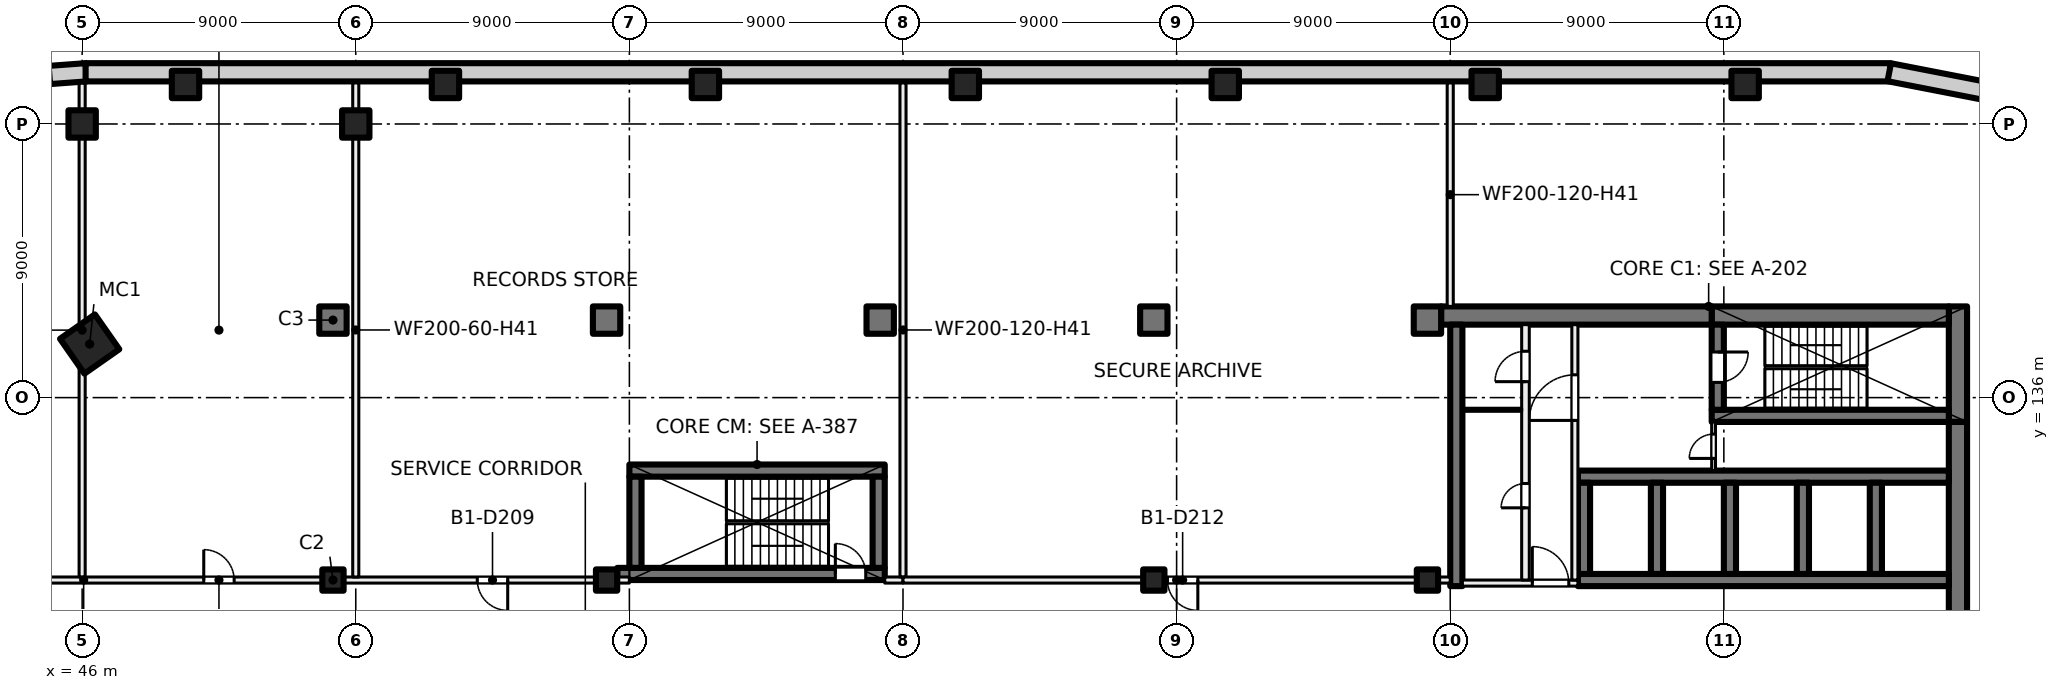
"""IFC4 building model, lengths in metres.
Left out: names, types, materials, properties, quantities, classifications, styles, units other than length and angle.
Written with IfcOpenShell. Run it as: python <this file> out.ifc"""

import sys

from ifc_helpers import new_model, si_unit, direction, frame, frame_2d, origin, origin_2d, place, context, subcontext, project, spatial, rectangle, hollow_rectangle, extrude, element, fill, save


model = new_model("IFC4")
c1 = context("Model", 3, precision=1e-05, world=origin(), true_north=direction((0.0, 1.0)))
c2 = subcontext(c1, "Body", "Model", "MODEL_VIEW")
j1 = project(units=[si_unit("LENGTHUNIT", "METRE"), si_unit("PLANEANGLEUNIT", "RADIAN")], contexts=[c1])
p1 = place(None, origin())
s1 = spatial("IfcSite", under=j1, at=p1, CompositionType="ELEMENT")
p2 = place(p1, origin())
s2 = spatial("IfcBuilding", under=s1, at=p2, CompositionType="ELEMENT")
p3 = place(p2, frame((0.0, 0.0, -4.5)))
s3 = spatial("IfcBuildingStorey", under=s2, at=p3, CompositionType="ELEMENT", Elevation=-4.5)
p4 = place(p3, frame((44.923, 146.611, 0.0), z_axis=(0.0, 0.0, 1.0), x_axis=(0.99726994401, 0.073842120603, 0.0)))
e1 = element("IfcWall", 1, at=p4, inside=s3, PredefinedType="SHEAR", context=c2, shape_type="SweptSolid", body=[
    extrude(rectangle(XDim=1.217, YDim=0.6, at=frame_2d((0.608, 0.0))), origin(), (0.0, 0.0, 1.0), 4.5),
])
p5 = place(p3, frame((46.114, 146.7, 0.0), z_axis=(0.0, 0.0, 1.0), x_axis=(1.0, 0.0, 0.0)))
e2 = element("IfcWall", 2, at=p5, inside=s3, PredefinedType="SHEAR", context=c2, shape_type="SweptSolid", body=[
    extrude(rectangle(XDim=59.364, YDim=0.6, at=frame_2d((29.682, 0.0))), origin(), (0.0, 0.0, 1.0), 4.5),
])
p6 = place(p3, frame((105.44, 146.702, 0.0), z_axis=(0.0, 0.0, 1.0), x_axis=(0.981593603981, -0.190981665674, 0.0)))
e3 = element("IfcWall", 3, at=p6, inside=s3, PredefinedType="SHEAR", context=c2, shape_type="SweptSolid", body=[
    extrude(rectangle(XDim=4.025, YDim=0.6, at=frame_2d((2.013, 0.0))), origin(), (0.0, 0.0, 1.0), 4.5),
])
for number, where, z_axis, x_axis in (
    (4, (46.0, 145.0, 0.0), (0.0, 0.0, 1.0), (1.0, 0.0, 0.0)),
    (5, (55.0, 145.0, 0.0), (0.0, 0.0, 1.0), (1.0, 0.0, 0.0)),
    (6, (49.4, 146.3, 0.0), (0.0, 0.0, 1.0), (1.0, 0.0, 0.0)),
    (7, (57.95, 146.3, 0.0), (0.0, 0.0, 1.0), (1.0, 0.0, 0.0)),
    (8, (66.5, 146.3, 0.0), (0.0, 0.0, 1.0), (1.0, 0.0, 0.0)),
    (9, (75.05, 146.3, 0.0), (0.0, 0.0, 1.0), (1.0, 0.0, 0.0)),
    (10, (83.6, 146.3, 0.0), (0.0, 0.0, 1.0), (1.0, 0.0, 0.0)),
    (11, (92.15, 146.3, 0.0), (0.0, 0.0, 1.0), (1.0, 0.0, 0.0)),
    (12, (100.7, 146.3, 0.0), (0.0, 0.0, 1.0), (1.0, 0.0, 0.0)),
):
    element("IfcColumn", number, at=place(p3, frame(where, z_axis=z_axis, x_axis=x_axis)), inside=s3, PredefinedType="COLUMN", context=c2, shape_type="SweptSolid", body=[
        extrude(rectangle(XDim=0.9, YDim=0.9, at=origin_2d()), origin(), (0.0, 0.0, 1.0), 4.5),
    ])
p7 = place(p3, frame((46.247, 137.762, 0.0), z_axis=(0.0, 0.0, 1.0), x_axis=(0.573576436351, -0.819152044289, 0.0)))
e13 = element("IfcColumn", 13, at=p7, inside=s3, PredefinedType="COLUMN", context=c2, shape_type="SweptSolid", body=[
    extrude(hollow_rectangle(XDim=1.4, YDim=1.4, WallThickness=0.04, at=origin_2d()), origin(), (0.0, 0.0, 1.0), 4.5),
])
for number, where, z_axis, x_axis in (
    (14, (54.25, 130.0, 0.0), (0.0, 0.0, 1.0), (1.0, 0.0, 0.0)),
    (15, (63.25, 130.0, 0.0), (0.0, 0.0, 1.0), (1.0, 0.0, 0.0)),
    (16, (81.25, 130.0, 0.0), (0.0, 0.0, 1.0), (1.0, 0.0, 0.0)),
    (17, (90.25, 130.0, 0.0), (0.0, 0.0, 1.0), (1.0, 0.0, 0.0)),
):
    element("IfcColumn", number, at=place(p3, frame(where, z_axis=z_axis, x_axis=x_axis)), inside=s3, PredefinedType="COLUMN", context=c2, shape_type="SweptSolid", body=[
        extrude(rectangle(XDim=0.7, YDim=0.7, at=origin_2d()), origin(), (0.0, 0.0, 1.0), 4.5),
    ])
for number, where, z_axis, x_axis in (
    (18, (54.25, 138.55, 0.0), (0.0, 0.0, 1.0), (1.0, 0.0, 0.0)),
    (19, (63.25, 138.55, 0.0), (0.0, 0.0, 1.0), (1.0, 0.0, 0.0)),
    (20, (72.25, 138.55, 0.0), (0.0, 0.0, 1.0), (1.0, 0.0, 0.0)),
    (21, (81.25, 138.55, 0.0), (0.0, 0.0, 1.0), (1.0, 0.0, 0.0)),
    (22, (90.25, 138.55, 0.0), (0.0, 0.0, 1.0), (1.0, 0.0, 0.0)),
):
    element("IfcColumn", number, at=place(p3, frame(where, z_axis=z_axis, x_axis=x_axis)), inside=s3, PredefinedType="COLUMN", context=c2, shape_type="SweptSolid", body=[
        extrude(rectangle(XDim=0.9, YDim=0.9, at=origin_2d()), origin(), (0.0, 0.0, 1.0), 4.5),
    ])
p8 = place(p3, frame((107.7, 139.0, 0.0), z_axis=(0.0, 0.0, 1.0), x_axis=(0.0, -1.0, 0.0)))
e23 = element("IfcWall", 23, at=p8, inside=s3, PredefinedType="SHEAR", context=c2, shape_type="SweptSolid", body=[
    extrude(rectangle(XDim=3.8, YDim=0.6, at=frame_2d((1.9, 0.0))), origin(), (0.0, 0.0, 1.0), 4.5),
])
p9 = place(p3, frame((107.7, 135.2, 0.0), z_axis=(0.0, 0.0, 1.0), x_axis=(0.0, -1.0, 0.0)))
e24 = element("IfcWall", 24, at=p9, inside=s3, PredefinedType="SHEAR", context=c2, shape_type="SweptSolid", body=[
    extrude(rectangle(XDim=14.4, YDim=0.6, at=frame_2d((7.2, 0.0))), origin(), (0.0, 0.0, 1.0), 4.5),
])
p10 = place(p3, frame((107.4, 138.7, 0.0), z_axis=(0.0, 0.0, 1.0), x_axis=(-1.0, 0.0, 0.0)))
e25 = element("IfcWall", 25, at=p10, inside=s3, PredefinedType="SHEAR", context=c2, shape_type="SweptSolid", body=[
    extrude(rectangle(XDim=7.8, YDim=0.6, at=frame_2d((3.9, 0.0))), origin(), (0.0, 0.0, 1.0), 4.5),
])
p11 = place(p3, frame((99.6, 138.7, 0.0), z_axis=(0.0, 0.0, 1.0), x_axis=(-1.0, 0.0, 0.0)))
e26 = element("IfcWall", 26, at=p11, inside=s3, PredefinedType="SHEAR", context=c2, shape_type="SweptSolid", body=[
    extrude(rectangle(XDim=8.9, YDim=0.6, at=frame_2d((4.45, 0.0))), origin(), (0.0, 0.0, 1.0), 4.5),
])
p12 = place(p3, frame((107.4, 135.4, 0.0), z_axis=(0.0, 0.0, 1.0), x_axis=(-1.0, 0.0, 0.0)))
e27 = element("IfcWall", 27, at=p12, inside=s3, PredefinedType="SHEAR", context=c2, shape_type="SweptSolid", body=[
    extrude(rectangle(XDim=7.8, YDim=0.4, at=frame_2d((3.9, 0.0))), origin(), (0.0, 0.0, 1.0), 4.5),
])
p13 = place(p3, frame((99.8, 138.4, 0.0), z_axis=(0.0, 0.0, 1.0), x_axis=(0.0, -1.0, 0.0)))
e28 = element("IfcWall", 28, at=p13, inside=s3, PredefinedType="SHEAR", context=c2, shape_type="SweptSolid", body=[
    extrude(rectangle(XDim=2.8, YDim=0.4, at=frame_2d((1.4, 0.0))), origin(), (0.0, 0.0, 1.0), 4.5),
])
p14 = place(p13, frame((0.9, 0.0, 0.0)))
e29 = element("IfcOpeningElement", 29, at=p14, cuts=e28, PredefinedType="OPENING", context=c2, shape_type="SweptSolid", body=[
    extrude(rectangle(XDim=1.0, YDim=2.1, at=frame_2d((0.5, 1.05))), frame((0.0, 0.21, 0.0), z_axis=(0.0, -1.0, 0.0), x_axis=(1.0, 0.0, 0.0)), (0.0, 0.0, 1.0), 0.42),
])
for number, where, z_axis, x_axis in (
    (30, (107.4, 130.0, 0.0), (0.0, 0.0, 1.0), (-1.0, 0.0, 0.0)),
    (31, (107.4, 133.4, 0.0), (0.0, 0.0, 1.0), (-1.0, 0.0, 0.0)),
):
    element("IfcWall", number, at=place(p3, frame(where, z_axis=z_axis, x_axis=x_axis)), inside=s3, PredefinedType="SHEAR", context=c2, shape_type="SweptSolid", body=[
        extrude(rectangle(XDim=12.2, YDim=0.4, at=frame_2d((6.1, 0.0))), origin(), (0.0, 0.0, 1.0), 4.5),
    ])
for number, where, z_axis, x_axis in (
    (32, (105.0, 133.2, 0.0), (0.0, 0.0, 1.0), (0.0, -1.0, 0.0)),
    (33, (102.6, 133.2, 0.0), (0.0, 0.0, 1.0), (0.0, -1.0, 0.0)),
    (34, (100.2, 133.2, 0.0), (0.0, 0.0, 1.0), (0.0, -1.0, 0.0)),
    (35, (97.8, 133.2, 0.0), (0.0, 0.0, 1.0), (0.0, -1.0, 0.0)),
    (36, (95.4, 133.2, 0.0), (0.0, 0.0, 1.0), (0.0, -1.0, 0.0)),
):
    element("IfcWall", number, at=place(p3, frame(where, z_axis=z_axis, x_axis=x_axis)), inside=s3, PredefinedType="SHEAR", context=c2, shape_type="SweptSolid", body=[
        extrude(rectangle(XDim=3.0, YDim=0.4, at=frame_2d((1.5, 0.0))), origin(), (0.0, 0.0, 1.0), 4.5),
    ])
p15 = place(p3, frame((91.2, 138.4, 0.0), z_axis=(0.0, 0.0, 1.0), x_axis=(0.0, -1.0, 0.0)))
e37 = element("IfcWall", 37, at=p15, inside=s3, PredefinedType="SHEAR", context=c2, shape_type="SweptSolid", body=[
    extrude(rectangle(XDim=8.6, YDim=0.4, at=frame_2d((4.3, 0.0))), origin(), (0.0, 0.0, 1.0), 4.5),
])
p16 = place(p3, frame((63.6, 130.2, 0.0), z_axis=(0.0, 0.0, 1.0), x_axis=(1.0, 0.0, 0.0)))
e38 = element("IfcWall", 38, at=p16, inside=s3, PredefinedType="SHEAR", context=c2, shape_type="SweptSolid", body=[
    extrude(rectangle(XDim=8.8, YDim=0.4, at=frame_2d((4.4, 0.0))), origin(), (0.0, 0.0, 1.0), 4.5),
])
p17 = place(p16, frame((7.175, 0.0, 0.0)))
e39 = element("IfcOpeningElement", 39, at=p17, cuts=e38, PredefinedType="OPENING", context=c2, shape_type="SweptSolid", body=[
    extrude(rectangle(XDim=1.0, YDim=2.1, at=frame_2d((0.5, 1.05))), frame((0.0, 0.21, 0.0), z_axis=(0.0, -1.0, 0.0), x_axis=(1.0, 0.0, 0.0)), (0.0, 0.0, 1.0), 0.42),
])
p18 = place(p3, frame((64.0, 133.6, 0.0), z_axis=(0.0, 0.0, 1.0), x_axis=(1.0, 0.0, 0.0)))
e40 = element("IfcWall", 40, at=p18, inside=s3, PredefinedType="SHEAR", context=c2, shape_type="SweptSolid", body=[
    extrude(rectangle(XDim=8.4, YDim=0.4, at=frame_2d((4.2, 0.0))), origin(), (0.0, 0.0, 1.0), 4.5),
])
for number, where, z_axis, x_axis in (
    (41, (64.2, 130.4, 0.0), (0.0, 0.0, 1.0), (0.0, 1.0, 0.0)),
    (42, (72.2, 130.4, 0.0), (0.0, 0.0, 1.0), (0.0, 1.0, 0.0)),
):
    element("IfcWall", number, at=place(p3, frame(where, z_axis=z_axis, x_axis=x_axis)), inside=s3, PredefinedType="SHEAR", context=c2, shape_type="SweptSolid", body=[
        extrude(rectangle(XDim=3.0, YDim=0.4, at=frame_2d((1.5, 0.0))), origin(), (0.0, 0.0, 1.0), 4.5),
    ])
p19 = place(p3, frame((91.4, 129.9, 0.0), z_axis=(0.0, 0.0, 1.0), x_axis=(1.0, 0.0, 0.0)))
e43 = element("IfcWall", 43, at=p19, inside=s3, PredefinedType="PARTITIONING", context=c2, shape_type="SweptSolid", body=[
    extrude(rectangle(XDim=3.8, YDim=0.2, at=frame_2d((1.9, 0.0))), origin(), (0.0, 0.0, 1.0), 4.1),
])
p20 = place(p19, frame((2.3, 0.0, 0.0)))
e44 = element("IfcOpeningElement", 44, at=p20, cuts=e43, PredefinedType="OPENING", context=c2, shape_type="SweptSolid", body=[
    extrude(rectangle(XDim=1.2, YDim=2.1, at=frame_2d((0.6, 1.05))), frame((0.0, 0.11, 0.0), z_axis=(0.0, -1.0, 0.0), x_axis=(1.0, 0.0, 0.0)), (0.0, 0.0, 1.0), 0.22),
])
p21 = place(p3, frame((95.1, 130.0, 0.0), z_axis=(0.0, 0.0, 1.0), x_axis=(0.0, 1.0, 0.0)))
e45 = element("IfcWall", 45, at=p21, inside=s3, PredefinedType="PARTITIONING", context=c2, shape_type="SweptSolid", body=[
    extrude(rectangle(XDim=8.4, YDim=0.2, at=frame_2d((4.2, 0.0))), origin(), (0.0, 0.0, 1.0), 4.1),
])
p22 = place(p21, frame((5.25, 0.0, 0.0)))
e46 = element("IfcOpeningElement", 46, at=p22, cuts=e45, PredefinedType="OPENING", context=c2, shape_type="SweptSolid", body=[
    extrude(rectangle(XDim=1.5, YDim=2.1, at=frame_2d((0.75, 1.05))), frame((0.0, 0.11, 0.0), z_axis=(0.0, -1.0, 0.0), x_axis=(1.0, 0.0, 0.0)), (0.0, 0.0, 1.0), 0.22),
])
p23 = place(p3, frame((93.475, 130.0, 0.0), z_axis=(0.0, 0.0, 1.0), x_axis=(0.0, 1.0, 0.0)))
e47 = element("IfcWall", 47, at=p23, inside=s3, PredefinedType="PARTITIONING", context=c2, shape_type="SweptSolid", body=[
    extrude(rectangle(XDim=8.4, YDim=0.25, at=frame_2d((4.2, 0.0))), origin(), (0.0, 0.0, 1.0), 4.1),
])
p24 = place(p23, frame((2.375, 0.0, 0.0)))
e48 = element("IfcOpeningElement", 48, at=p24, cuts=e47, PredefinedType="OPENING", context=c2, shape_type="SweptSolid", body=[
    extrude(rectangle(XDim=0.8, YDim=2.1, at=frame_2d((0.4, 1.05))), frame((0.0, 0.135, 0.0), z_axis=(0.0, -1.0, 0.0), x_axis=(1.0, 0.0, 0.0)), (0.0, 0.0, 1.0), 0.27),
])
p25 = place(p23, frame((6.525, 0.0, 0.0)))
e49 = element("IfcOpeningElement", 49, at=p25, cuts=e47, PredefinedType="OPENING", context=c2, shape_type="SweptSolid", body=[
    extrude(rectangle(XDim=1.0, YDim=2.1, at=frame_2d((0.5, 1.05))), frame((0.0, 0.135, 0.0), z_axis=(0.0, -1.0, 0.0), x_axis=(1.0, 0.0, 0.0)), (0.0, 0.0, 1.0), 0.27),
])
p26 = place(p3, frame((99.663, 133.6, 0.0), z_axis=(0.0, 0.0, 1.0), x_axis=(0.0, 1.0, 0.0)))
e50 = element("IfcWall", 50, at=p26, inside=s3, PredefinedType="PARTITIONING", context=c2, shape_type="SweptSolid", body=[
    extrude(rectangle(XDim=1.6, YDim=0.125, at=frame_2d((0.8, 0.0))), origin(), (0.0, 0.0, 1.0), 4.1),
])
p27 = place(p26, frame((0.4, 0.0, 0.0)))
e51 = element("IfcOpeningElement", 51, at=p27, cuts=e50, PredefinedType="OPENING", context=c2, shape_type="SweptSolid", body=[
    extrude(rectangle(XDim=0.8, YDim=2.1, at=frame_2d((0.4, 1.05))), frame((0.0, 0.073, 0.0), z_axis=(0.0, -1.0, 0.0), x_axis=(1.0, 0.0, 0.0)), (0.0, 0.0, 1.0), 0.145),
])
p28 = place(p3, frame((91.4, 135.6, 0.0), z_axis=(0.0, 0.0, 1.0), x_axis=(1.0, 0.0, 0.0)))
e52 = element("IfcWall", 52, at=p28, inside=s3, PredefinedType="PARTITIONING", context=c2, shape_type="SweptSolid", body=[
    extrude(rectangle(XDim=1.95, YDim=0.1, at=frame_2d((0.975, 0.0))), origin(), (0.0, 0.0, 1.0), 4.1),
])
p29 = place(p3, frame((28.1, 130.0, 0.0), z_axis=(0.0, 0.0, 1.0), x_axis=(1.0, 0.0, 0.0)))
e53 = element("IfcWall", 53, at=p29, inside=s3, PredefinedType="PARTITIONING", context=c2, shape_type="SweptSolid", body=[
    extrude(rectangle(XDim=35.9, YDim=0.2, at=frame_2d((17.95, 0.0))), origin(), (0.0, 0.0, 1.0), 4.1),
])
p30 = place(p29, frame((11.402, 0.0, 0.0)))
e54 = element("IfcOpeningElement", 54, at=p30, cuts=e53, PredefinedType="OPENING", context=c2, shape_type="SweptSolid", body=[
    extrude(rectangle(XDim=1.0, YDim=2.1, at=frame_2d((0.5, 1.05))), frame((0.0, 0.11, 0.0), z_axis=(0.0, -1.0, 0.0), x_axis=(1.0, 0.0, 0.0)), (0.0, 0.0, 1.0), 0.22),
])
p31 = place(p29, frame((21.9, 0.0, 0.0)))
e55 = element("IfcOpeningElement", 55, at=p31, cuts=e53, PredefinedType="OPENING", context=c2, shape_type="SweptSolid", body=[
    extrude(rectangle(XDim=1.0, YDim=2.1, at=frame_2d((0.5, 1.05))), frame((0.0, 0.11, 0.0), z_axis=(0.0, -1.0, 0.0), x_axis=(1.0, 0.0, 0.0)), (0.0, 0.0, 1.0), 0.22),
])
p32 = place(p29, frame((30.898, 0.0, 0.0)))
e56 = element("IfcOpeningElement", 56, at=p32, cuts=e53, PredefinedType="OPENING", context=c2, shape_type="SweptSolid", body=[
    extrude(rectangle(XDim=1.0, YDim=2.1, at=frame_2d((0.5, 1.05))), frame((0.0, 0.11, 0.0), z_axis=(0.0, -1.0, 0.0), x_axis=(1.0, 0.0, 0.0)), (0.0, 0.0, 1.0), 0.22),
])
p33 = place(p3, frame((46.0, 130.1, 0.0), z_axis=(0.0, 0.0, 1.0), x_axis=(0.0, 1.0, 0.0)))
e57 = element("IfcWall", 57, at=p33, inside=s3, PredefinedType="PARTITIONING", context=c2, shape_type="SweptSolid", body=[
    extrude(rectangle(XDim=16.24, YDim=0.2, at=frame_2d((8.12, 0.0))), origin(), (0.0, 0.0, 1.0), 4.1),
])
p34 = place(p3, frame((55.0, 130.1, 0.0), z_axis=(0.0, 0.0, 1.0), x_axis=(0.0, 1.0, 0.0)))
e58 = element("IfcWall", 58, at=p34, inside=s3, PredefinedType="PARTITIONING", context=c2, shape_type="SweptSolid", body=[
    extrude(rectangle(XDim=16.25, YDim=0.2, at=frame_2d((8.125, 0.0))), origin(), (0.0, 0.0, 1.0), 4.1),
])
p35 = place(p3, frame((72.4, 130.0, 0.0), z_axis=(0.0, 0.0, 1.0), x_axis=(1.0, 0.0, 0.0)))
e59 = element("IfcWall", 59, at=p35, inside=s3, PredefinedType="PARTITIONING", context=c2, shape_type="SweptSolid", body=[
    extrude(rectangle(XDim=0.6, YDim=0.2, at=frame_2d((0.3, 0.0))), origin(), (0.0, 0.0, 1.0), 4.1),
])
p36 = place(p3, frame((73.0, 130.1, 0.0), z_axis=(0.0, 0.0, 1.0), x_axis=(0.0, 1.0, 0.0)))
e60 = element("IfcWall", 60, at=p36, inside=s3, PredefinedType="PARTITIONING", context=c2, shape_type="SweptSolid", body=[
    extrude(rectangle(XDim=16.25, YDim=0.2, at=frame_2d((8.125, 0.0))), origin(), (0.0, 0.0, 1.0), 4.1),
])
p37 = place(p3, frame((73.0, 130.0, 0.0), z_axis=(0.0, 0.0, 1.0), x_axis=(1.0, 0.0, 0.0)))
e61 = element("IfcWall", 61, at=p37, inside=s3, PredefinedType="PARTITIONING", context=c2, shape_type="SweptSolid", body=[
    extrude(rectangle(XDim=18.0, YDim=0.2, at=frame_2d((9.0, 0.0))), origin(), (0.0, 0.0, 1.0), 4.1),
])
p38 = place(p37, frame((8.698, 0.0, 0.0)))
e62 = element("IfcOpeningElement", 62, at=p38, cuts=e61, PredefinedType="OPENING", context=c2, shape_type="SweptSolid", body=[
    extrude(rectangle(XDim=1.0, YDim=2.1, at=frame_2d((0.5, 1.05))), frame((0.0, 0.11, 0.0), z_axis=(0.0, -1.0, 0.0), x_axis=(1.0, 0.0, 0.0)), (0.0, 0.0, 1.0), 0.22),
])
p39 = place(p3, frame((91.0, 139.0, 0.0), z_axis=(0.0, 0.0, 1.0), x_axis=(0.0, 1.0, 0.0)))
e63 = element("IfcWall", 63, at=p39, inside=s3, PredefinedType="PARTITIONING", context=c2, shape_type="SweptSolid", body=[
    extrude(rectangle(XDim=7.35, YDim=0.2, at=frame_2d((3.675, 0.0))), origin(), (0.0, 0.0, 1.0), 4.1),
])
p40 = place(p20, origin())
e64 = element("IfcDoor", 64, at=p40, inside=s3, OperationType="DOUBLE_DOOR_SINGLE_SWING", PredefinedType="DOOR", context=c2, shape_type="SweptSolid", body=[
    extrude(rectangle(XDim=1.2, YDim=2.1, at=frame_2d((0.6, 1.05))), frame((0.0, 0.025, 0.0), z_axis=(0.0, -1.0, 0.0), x_axis=(1.0, 0.0, 0.0)), (0.0, 0.0, 1.0), 0.05),
])
fill(e44, e64)
p41 = place(p22, origin())
e65 = element("IfcDoor", 65, at=p41, inside=s3, OperationType="DOUBLE_DOOR_SINGLE_SWING", PredefinedType="DOOR", context=c2, shape_type="SweptSolid", body=[
    extrude(rectangle(XDim=1.5, YDim=2.1, at=frame_2d((0.75, 1.05))), frame((0.0, 0.025, 0.0), z_axis=(0.0, -1.0, 0.0), x_axis=(1.0, 0.0, 0.0)), (0.0, 0.0, 1.0), 0.05),
])
fill(e46, e65)
p42 = place(p14, origin())
e66 = element("IfcDoor", 66, at=p42, inside=s3, OperationType="SINGLE_SWING_RIGHT", PredefinedType="DOOR", context=c2, shape_type="SweptSolid", body=[
    extrude(rectangle(XDim=1.0, YDim=2.1, at=frame_2d((0.5, 1.05))), frame((0.0, 0.025, 0.0), z_axis=(0.0, -1.0, 0.0), x_axis=(1.0, 0.0, 0.0)), (0.0, 0.0, 1.0), 0.05),
])
fill(e29, e66)
p43 = place(p27, origin())
e67 = element("IfcDoor", 67, at=p43, inside=s3, OperationType="SINGLE_SWING_LEFT", PredefinedType="DOOR", context=c2, shape_type="SweptSolid", body=[
    extrude(rectangle(XDim=0.8, YDim=2.1, at=frame_2d((0.4, 1.05))), frame((0.0, 0.025, 0.0), z_axis=(0.0, -1.0, 0.0), x_axis=(1.0, 0.0, 0.0)), (0.0, 0.0, 1.0), 0.05),
])
fill(e51, e67)
p44 = place(p24, origin())
e68 = element("IfcDoor", 68, at=p44, inside=s3, OperationType="SINGLE_SWING_RIGHT", PredefinedType="DOOR", context=c2, shape_type="SweptSolid", body=[
    extrude(rectangle(XDim=0.8, YDim=2.1, at=frame_2d((0.4, 1.05))), frame((0.0, 0.025, 0.0), z_axis=(0.0, -1.0, 0.0), x_axis=(1.0, 0.0, 0.0)), (0.0, 0.0, 1.0), 0.05),
])
fill(e48, e68)
p45 = place(p25, origin())
e69 = element("IfcDoor", 69, at=p45, inside=s3, OperationType="SINGLE_SWING_LEFT", PredefinedType="DOOR", context=c2, shape_type="SweptSolid", body=[
    extrude(rectangle(XDim=1.0, YDim=2.1, at=frame_2d((0.5, 1.05))), frame((0.0, 0.025, 0.0), z_axis=(0.0, -1.0, 0.0), x_axis=(1.0, 0.0, 0.0)), (0.0, 0.0, 1.0), 0.05),
])
fill(e49, e69)
p46 = place(p17, origin())
e70 = element("IfcDoor", 70, at=p46, inside=s3, OperationType="SINGLE_SWING_LEFT", PredefinedType="DOOR", context=c2, shape_type="SweptSolid", body=[
    extrude(rectangle(XDim=1.0, YDim=2.1, at=frame_2d((0.5, 1.05))), frame((0.0, 0.025, 0.0), z_axis=(0.0, -1.0, 0.0), x_axis=(1.0, 0.0, 0.0)), (0.0, 0.0, 1.0), 0.05),
])
fill(e39, e70)
p47 = place(p31, origin())
e71 = element("IfcDoor", 71, at=p47, inside=s3, OperationType="SINGLE_SWING_LEFT", PredefinedType="DOOR", context=c2, shape_type="SweptSolid", body=[
    extrude(rectangle(XDim=1.0, YDim=2.1, at=frame_2d((0.5, 1.05))), frame((0.0, 0.025, 0.0), z_axis=(0.0, -1.0, 0.0), x_axis=(1.0, 0.0, 0.0)), (0.0, 0.0, 1.0), 0.05),
])
fill(e55, e71)
p48 = place(p32, origin())
e72 = element("IfcDoor", 72, at=p48, inside=s3, OperationType="SINGLE_SWING_RIGHT", PredefinedType="DOOR", context=c2, shape_type="SweptSolid", body=[
    extrude(rectangle(XDim=1.0, YDim=2.1, at=frame_2d((0.5, 1.05))), frame((0.0, 0.025, 0.0), z_axis=(0.0, -1.0, 0.0), x_axis=(1.0, 0.0, 0.0)), (0.0, 0.0, 1.0), 0.05),
])
fill(e56, e72)
p49 = place(p38, origin())
e73 = element("IfcDoor", 73, at=p49, inside=s3, OperationType="SINGLE_SWING_RIGHT", PredefinedType="DOOR", context=c2, shape_type="SweptSolid", body=[
    extrude(rectangle(XDim=1.0, YDim=2.1, at=frame_2d((0.5, 1.05))), frame((0.0, 0.025, 0.0), z_axis=(0.0, -1.0, 0.0), x_axis=(1.0, 0.0, 0.0)), (0.0, 0.0, 1.0), 0.05),
])
fill(e62, e73)
save(model, sys.argv[1])
